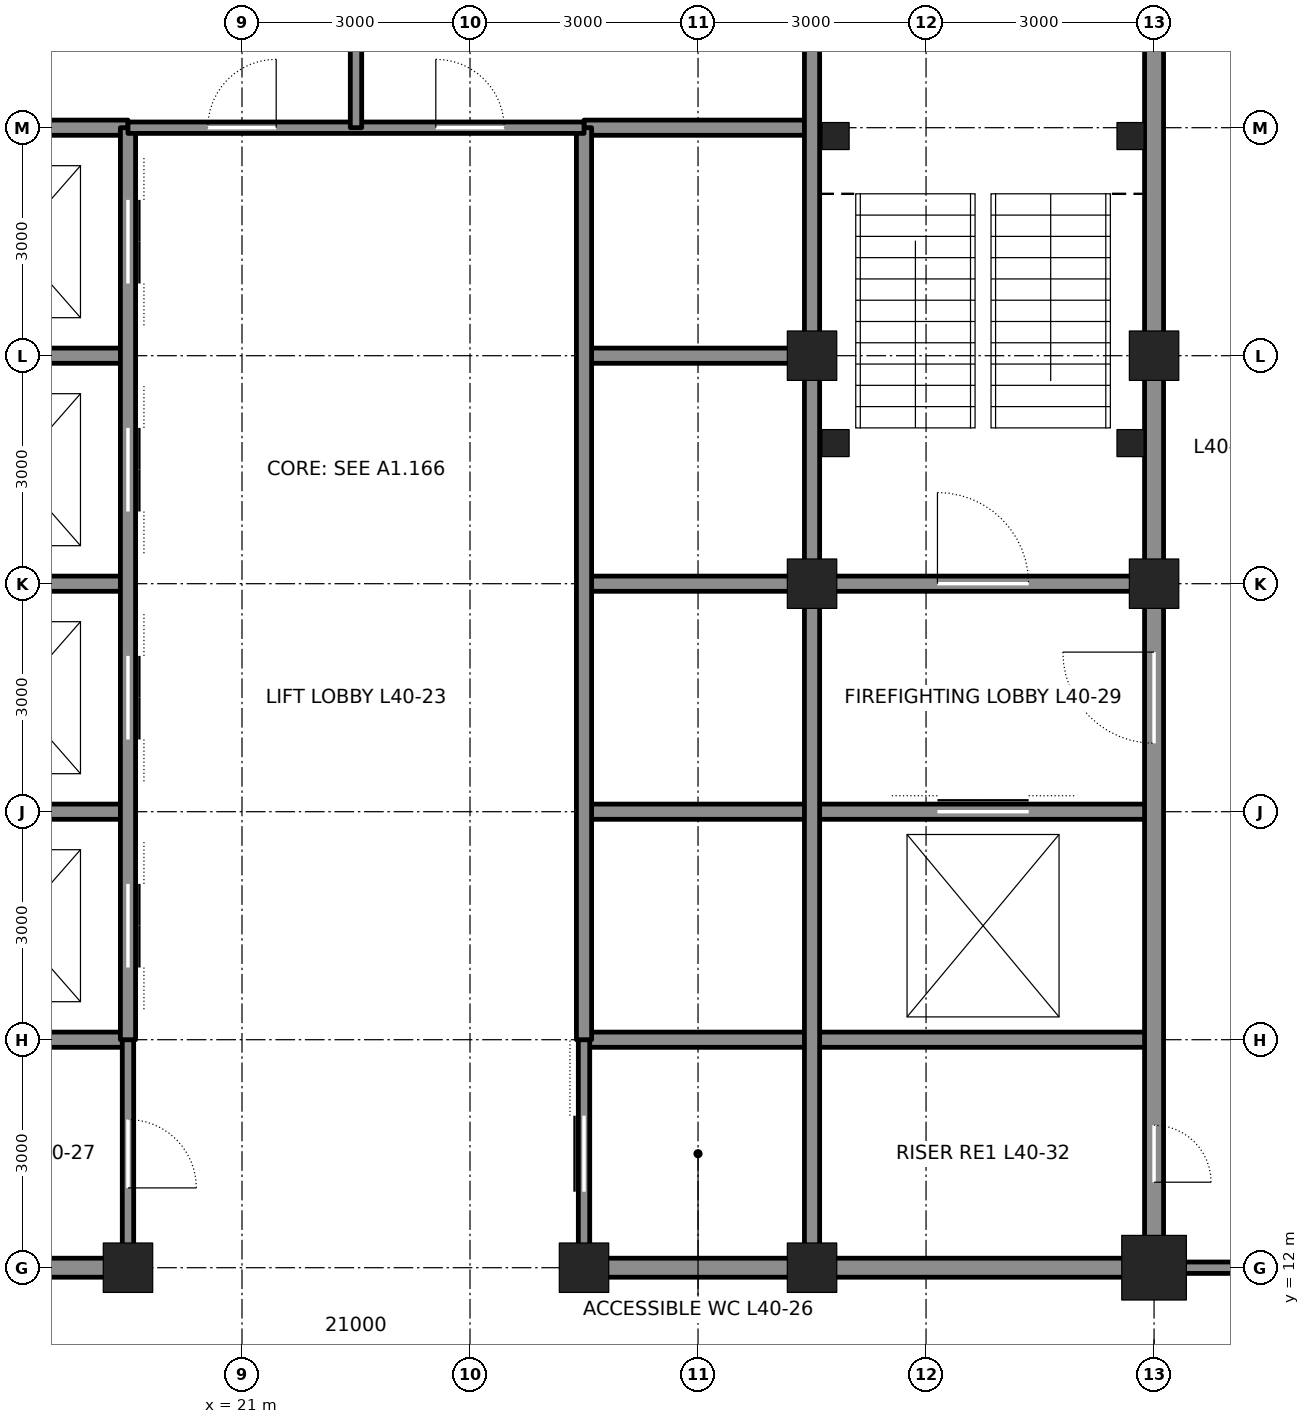
"""IFC4 building model, lengths in metres.
Left out: names, types, materials, properties, quantities, classifications, styles, units other than length and angle.
Written with IfcOpenShell. Run it as: python <this file> out.ifc"""

import sys

from ifc_helpers import new_model, si_unit, direction, frame, frame_2d, origin, origin_2d, place, context, subcontext, project, spatial, rectangle, hollow_rectangle, extrude, element, fill, save


model = new_model("IFC4")
c1 = context("Model", 3, precision=1e-05, world=origin(), true_north=direction((0.0, 1.0)))
c2 = subcontext(c1, "Body", "Model", "MODEL_VIEW")
j1 = project(units=[si_unit("LENGTHUNIT", "METRE"), si_unit("PLANEANGLEUNIT", "RADIAN")], contexts=[c1])
p1 = place(None, origin())
s1 = spatial("IfcSite", under=j1, at=p1, CompositionType="ELEMENT")
p2 = place(p1, origin())
s2 = spatial("IfcBuilding", under=s1, at=p2, CompositionType="ELEMENT")
p3 = place(p2, frame((0.0, 0.0, 184.5)))
s3 = spatial("IfcBuildingStorey", under=s2, at=p3, CompositionType="ELEMENT", Elevation=184.5)
for number, where, z_axis, x_axis in (
    (1, (19.5, 12.0, 0.0), (0.0, 0.0, 1.0), (1.0, 0.0, 0.0)),
    (2, (25.5, 12.0, 0.0), (0.0, 0.0, 1.0), (1.0, 0.0, 0.0)),
    (3, (28.5, 12.0, 0.0), (0.0, 0.0, 1.0), (1.0, 0.0, 0.0)),
):
    element("IfcColumn", number, at=place(p3, frame(where, z_axis=z_axis, x_axis=x_axis)), inside=s3, PredefinedType="COLUMN", context=c2, shape_type="SweptSolid", body=[
        extrude(hollow_rectangle(XDim=0.65, YDim=0.65, WallThickness=0.065, at=origin_2d()), origin(), (0.0, 0.0, 1.0), 4.2),
    ])
p4 = place(p3, frame((33.0, 12.0, 0.0), z_axis=(0.0, 0.0, 1.0), x_axis=(1.0, 0.0, 0.0)))
e4 = element("IfcColumn", 4, at=p4, inside=s3, PredefinedType="COLUMN", context=c2, shape_type="SweptSolid", body=[
    extrude(hollow_rectangle(XDim=0.85, YDim=0.85, WallThickness=0.085, at=origin_2d()), origin(), (0.0, 0.0, 1.0), 4.2),
])
for number, where, z_axis, x_axis in (
    (5, (33.0, 21.0, 0.0), (0.0, 0.0, 1.0), (1.0, 0.0, 0.0)),
    (6, (33.0, 24.0, 0.0), (0.0, 0.0, 1.0), (1.0, 0.0, 0.0)),
    (7, (28.5, 21.0, 0.0), (0.0, 0.0, 1.0), (1.0, 0.0, 0.0)),
    (8, (28.5, 24.0, 0.0), (0.0, 0.0, 1.0), (1.0, 0.0, 0.0)),
):
    element("IfcColumn", number, at=place(p3, frame(where, z_axis=z_axis, x_axis=x_axis)), inside=s3, PredefinedType="COLUMN", context=c2, shape_type="SweptSolid", body=[
        extrude(hollow_rectangle(XDim=0.65, YDim=0.65, WallThickness=0.065, at=origin_2d()), origin(), (0.0, 0.0, 1.0), 4.2),
    ])
for number, where, z_axis, x_axis in (
    (9, (16.75, 12.0, 0.0), (0.0, 0.0, 1.0), (1.0, 0.0, 0.0)),
    (10, (25.75, 12.0, 0.0), (0.0, 0.0, 1.0), (1.0, 0.0, 0.0)),
):
    element("IfcWall", number, at=place(p3, frame(where, z_axis=z_axis, x_axis=x_axis)), inside=s3, PredefinedType="SOLIDWALL", context=c2, shape_type="SweptSolid", body=[
        extrude(rectangle(XDim=2.5, YDim=0.25, at=frame_2d((1.25, 0.0))), origin(), (0.0, 0.0, 1.0), 3.181),
    ])
p5 = place(p3, frame((28.75, 12.0, 0.0), z_axis=(0.0, 0.0, 1.0), x_axis=(1.0, 0.0, 0.0)))
e11 = element("IfcWall", 11, at=p5, inside=s3, PredefinedType="SOLIDWALL", context=c2, shape_type="SweptSolid", body=[
    extrude(rectangle(XDim=4.0, YDim=0.25, at=frame_2d((2.0, 0.0))), origin(), (0.0, 0.0, 1.0), 3.181),
])
for number, where, z_axis, x_axis in (
    (12, (12.0, 15.0, 0.0), (0.0, 0.0, 1.0), (1.0, 0.0, 0.0)),
    (13, (25.5, 15.0, 0.0), (0.0, 0.0, 1.0), (1.0, 0.0, 0.0)),
):
    element("IfcWall", number, at=place(p3, frame(where, z_axis=z_axis, x_axis=x_axis)), inside=s3, PredefinedType="SOLIDWALL", context=c2, shape_type="SweptSolid", body=[
        extrude(rectangle(XDim=7.5, YDim=0.2, at=frame_2d((3.75, 0.0))), origin(), (0.0, 0.0, 1.0), 4.04),
    ])
for number, where, z_axis, x_axis in (
    (14, (16.75, 24.0, 0.0), (0.0, 0.0, 1.0), (1.0, 0.0, 0.0)),
    (15, (25.5, 24.0, 0.0), (0.0, 0.0, 1.0), (1.0, 0.0, 0.0)),
):
    element("IfcWall", number, at=place(p3, frame(where, z_axis=z_axis, x_axis=x_axis)), inside=s3, PredefinedType="SOLIDWALL", context=c2, shape_type="SweptSolid", body=[
        extrude(rectangle(XDim=2.75, YDim=0.2, at=frame_2d((1.375, 0.0))), origin(), (0.0, 0.0, 1.0), 3.09),
    ])
p6 = place(p3, frame((12.0, 27.0, 0.0), z_axis=(0.0, 0.0, 1.0), x_axis=(1.0, 0.0, 0.0)))
e16 = element("IfcWall", 16, at=p6, inside=s3, PredefinedType="SOLIDWALL", context=c2, shape_type="SweptSolid", body=[
    extrude(rectangle(XDim=7.5, YDim=0.2, at=frame_2d((3.75, 0.0))), origin(), (0.0, 0.0, 1.0), 4.04),
])
p7 = place(p6, frame((1.65, 0.0, 0.0)))
e17 = element("IfcOpeningElement", 17, at=p7, cuts=e16, PredefinedType="OPENING", context=c2, shape_type="SweptSolid", body=[
    extrude(rectangle(XDim=1.2, YDim=2.1, at=frame_2d((0.6, 1.05))), frame((0.0, 0.11, 0.0), z_axis=(0.0, -1.0, 0.0), x_axis=(1.0, 0.0, 0.0)), (0.0, 0.0, 1.0), 0.22),
])
for number, where, z_axis, x_axis in (
    (18, (25.5, 27.0, 0.0), (0.0, 0.0, 1.0), (1.0, 0.0, 0.0)),
    (19, (16.5, 18.0, 0.0), (0.0, 0.0, 1.0), (1.0, 0.0, 0.0)),
):
    element("IfcWall", number, at=place(p3, frame(where, z_axis=z_axis, x_axis=x_axis)), inside=s3, PredefinedType="SOLIDWALL", context=c2, shape_type="SweptSolid", body=[
        extrude(rectangle(XDim=3.0, YDim=0.2, at=frame_2d((1.5, 0.0))), origin(), (0.0, 0.0, 1.0), 4.04),
    ])
p8 = place(p3, frame((25.5, 18.0, 0.0), z_axis=(0.0, 0.0, 1.0), x_axis=(1.0, 0.0, 0.0)))
e20 = element("IfcWall", 20, at=p8, inside=s3, PredefinedType="SOLIDWALL", context=c2, shape_type="SweptSolid", body=[
    extrude(rectangle(XDim=7.5, YDim=0.2, at=frame_2d((3.75, 0.0))), origin(), (0.0, 0.0, 1.0), 4.04),
])
p9 = place(p8, frame((4.65, 0.0, 0.0)))
e21 = element("IfcOpeningElement", 21, at=p9, cuts=e20, PredefinedType="OPENING", context=c2, shape_type="SweptSolid", body=[
    extrude(rectangle(XDim=1.2, YDim=2.1, at=frame_2d((0.6, 1.05))), frame((0.0, 0.11, 0.0), z_axis=(0.0, -1.0, 0.0), x_axis=(1.0, 0.0, 0.0)), (0.0, 0.0, 1.0), 0.22),
])
for number, where, z_axis, x_axis in (
    (22, (16.75, 21.0, 0.0), (0.0, 0.0, 1.0), (1.0, 0.0, 0.0)),
    (23, (25.5, 21.0, 0.0), (0.0, 0.0, 1.0), (1.0, 0.0, 0.0)),
):
    element("IfcWall", number, at=place(p3, frame(where, z_axis=z_axis, x_axis=x_axis)), inside=s3, PredefinedType="SOLIDWALL", context=c2, shape_type="SweptSolid", body=[
        extrude(rectangle(XDim=2.75, YDim=0.2, at=frame_2d((1.375, 0.0))), origin(), (0.0, 0.0, 1.0), 3.09),
    ])
p10 = place(p3, frame((28.75, 21.0, 0.0), z_axis=(0.0, 0.0, 1.0), x_axis=(1.0, 0.0, 0.0)))
e24 = element("IfcWall", 24, at=p10, inside=s3, PredefinedType="SOLIDWALL", context=c2, shape_type="SweptSolid", body=[
    extrude(rectangle(XDim=4.0, YDim=0.2, at=frame_2d((2.0, 0.0))), origin(), (0.0, 0.0, 1.0), 3.09),
])
p11 = place(p10, frame((1.4, 0.0, 0.0)))
e25 = element("IfcOpeningElement", 25, at=p11, cuts=e24, PredefinedType="OPENING", context=c2, shape_type="SweptSolid", body=[
    extrude(rectangle(XDim=1.2, YDim=2.1, at=frame_2d((0.6, 1.05))), frame((0.0, 0.11, 0.0), z_axis=(0.0, -1.0, 0.0), x_axis=(1.0, 0.0, 0.0)), (0.0, 0.0, 1.0), 0.22),
])
p12 = place(p3, frame((19.5, 12.25, 0.0), z_axis=(0.0, 0.0, 1.0), x_axis=(0.0, 1.0, 0.0)))
e26 = element("IfcWall", 26, at=p12, inside=s3, PredefinedType="PARTITIONING", context=c2, shape_type="SweptSolid", body=[
    extrude(rectangle(XDim=2.75, YDim=0.15, at=frame_2d((1.375, 0.0))), origin(), (0.0, 0.0, 1.0), 3.065),
])
p13 = place(p12, frame((0.8, 0.0, 0.0)))
e27 = element("IfcOpeningElement", 27, at=p13, cuts=e26, PredefinedType="OPENING", context=c2, shape_type="SweptSolid", body=[
    extrude(rectangle(XDim=0.9, YDim=2.1, at=frame_2d((0.45, 1.05))), frame((0.0, 0.085, 0.0), z_axis=(0.0, -1.0, 0.0), x_axis=(1.0, 0.0, 0.0)), (0.0, 0.0, 1.0), 0.17),
])
p14 = place(p3, frame((19.5, 15.0, 0.0), z_axis=(0.0, 0.0, 1.0), x_axis=(0.0, 1.0, 0.0)))
e28 = element("IfcWall", 28, at=p14, inside=s3, PredefinedType="SOLIDWALL", context=c2, shape_type="SweptSolid", body=[
    extrude(rectangle(XDim=12.0, YDim=0.2, at=frame_2d((6.0, 0.0))), origin(), (0.0, 0.0, 1.0), 3.065),
])
p15 = place(p14, frame((0.95, 0.0, 0.0)))
e29 = element("IfcOpeningElement", 29, at=p15, cuts=e28, PredefinedType="OPENING", context=c2, shape_type="SweptSolid", body=[
    extrude(rectangle(XDim=1.1, YDim=2.1, at=frame_2d((0.55, 1.05))), frame((0.0, 0.11, 0.0), z_axis=(0.0, -1.0, 0.0), x_axis=(1.0, 0.0, 0.0)), (0.0, 0.0, 1.0), 0.22),
])
p16 = place(p14, frame((3.95, 0.0, 0.0)))
e30 = element("IfcOpeningElement", 30, at=p16, cuts=e28, PredefinedType="OPENING", context=c2, shape_type="SweptSolid", body=[
    extrude(rectangle(XDim=1.1, YDim=2.1, at=frame_2d((0.55, 1.05))), frame((0.0, 0.11, 0.0), z_axis=(0.0, -1.0, 0.0), x_axis=(1.0, 0.0, 0.0)), (0.0, 0.0, 1.0), 0.22),
])
p17 = place(p14, frame((6.95, 0.0, 0.0)))
e31 = element("IfcOpeningElement", 31, at=p17, cuts=e28, PredefinedType="OPENING", context=c2, shape_type="SweptSolid", body=[
    extrude(rectangle(XDim=1.1, YDim=2.1, at=frame_2d((0.55, 1.05))), frame((0.0, 0.11, 0.0), z_axis=(0.0, -1.0, 0.0), x_axis=(1.0, 0.0, 0.0)), (0.0, 0.0, 1.0), 0.22),
])
p18 = place(p14, frame((9.95, 0.0, 0.0)))
e32 = element("IfcOpeningElement", 32, at=p18, cuts=e28, PredefinedType="OPENING", context=c2, shape_type="SweptSolid", body=[
    extrude(rectangle(XDim=1.1, YDim=2.1, at=frame_2d((0.55, 1.05))), frame((0.0, 0.11, 0.0), z_axis=(0.0, -1.0, 0.0), x_axis=(1.0, 0.0, 0.0)), (0.0, 0.0, 1.0), 0.22),
])
p19 = place(p3, frame((25.5, 12.25, 0.0), z_axis=(0.0, 0.0, 1.0), x_axis=(0.0, 1.0, 0.0)))
e33 = element("IfcWall", 33, at=p19, inside=s3, PredefinedType="PARTITIONING", context=c2, shape_type="SweptSolid", body=[
    extrude(rectangle(XDim=2.75, YDim=0.15, at=frame_2d((1.375, 0.0))), origin(), (0.0, 0.0, 1.0), 3.065),
])
p20 = place(p19, frame((0.75, 0.0, 0.0)))
e34 = element("IfcOpeningElement", 34, at=p20, cuts=e33, PredefinedType="OPENING", context=c2, shape_type="SweptSolid", body=[
    extrude(rectangle(XDim=1.0, YDim=2.1, at=frame_2d((0.5, 1.05))), frame((0.0, 0.085, 0.0), z_axis=(0.0, -1.0, 0.0), x_axis=(1.0, 0.0, 0.0)), (0.0, 0.0, 1.0), 0.17),
])
p21 = place(p3, frame((25.5, 15.0, 0.0), z_axis=(0.0, 0.0, 1.0), x_axis=(0.0, 1.0, 0.0)))
e35 = element("IfcWall", 35, at=p21, inside=s3, PredefinedType="SOLIDWALL", context=c2, shape_type="SweptSolid", body=[
    extrude(rectangle(XDim=12.0, YDim=0.2, at=frame_2d((6.0, 0.0))), origin(), (0.0, 0.0, 1.0), 3.065),
])
p22 = place(p3, frame((28.5, 12.25, 0.0), z_axis=(0.0, 0.0, 1.0), x_axis=(0.0, 1.0, 0.0)))
e36 = element("IfcWall", 36, at=p22, inside=s3, PredefinedType="SOLIDWALL", context=c2, shape_type="SweptSolid", body=[
    extrude(rectangle(XDim=8.5, YDim=0.2, at=frame_2d((4.25, 0.0))), origin(), (0.0, 0.0, 1.0), 3.113),
])
p23 = place(p3, frame((28.5, 21.25, 0.0), z_axis=(0.0, 0.0, 1.0), x_axis=(0.0, 1.0, 0.0)))
e37 = element("IfcWall", 37, at=p23, inside=s3, PredefinedType="SOLIDWALL", context=c2, shape_type="SweptSolid", body=[
    extrude(rectangle(XDim=2.5, YDim=0.2, at=frame_2d((1.25, 0.0))), origin(), (0.0, 0.0, 1.0), 3.113),
])
p24 = place(p3, frame((28.5, 24.25, 0.0), z_axis=(0.0, 0.0, 1.0), x_axis=(0.0, 1.0, 0.0)))
e38 = element("IfcWall", 38, at=p24, inside=s3, PredefinedType="SOLIDWALL", context=c2, shape_type="SweptSolid", body=[
    extrude(rectangle(XDim=8.5, YDim=0.2, at=frame_2d((4.25, 0.0))), origin(), (0.0, 0.0, 1.0), 3.113),
])
p25 = place(p3, frame((33.0, 12.25, 0.0), z_axis=(0.0, 0.0, 1.0), x_axis=(0.0, 1.0, 0.0)))
e39 = element("IfcWall", 39, at=p25, inside=s3, PredefinedType="SOLIDWALL", context=c2, shape_type="SweptSolid", body=[
    extrude(rectangle(XDim=8.5, YDim=0.25, at=frame_2d((4.25, 0.0))), origin(), (0.0, 0.0, 1.0), 3.113),
])
p26 = place(p25, frame((6.65, 0.0, 0.0)))
e40 = element("IfcOpeningElement", 40, at=p26, cuts=e39, PredefinedType="OPENING", context=c2, shape_type="SweptSolid", body=[
    extrude(rectangle(XDim=1.2, YDim=2.1, at=frame_2d((0.6, 1.05))), frame((0.0, 0.135, 0.0), z_axis=(0.0, -1.0, 0.0), x_axis=(1.0, 0.0, 0.0)), (0.0, 0.0, 1.0), 0.27),
])
p27 = place(p25, frame((0.875, 0.0, 0.0)))
e41 = element("IfcOpeningElement", 41, at=p27, cuts=e39, PredefinedType="OPENING", context=c2, shape_type="SweptSolid", body=[
    extrude(rectangle(XDim=0.75, YDim=2.1, at=frame_2d((0.375, 1.05))), frame((0.0, 0.135, 0.0), z_axis=(0.0, -1.0, 0.0), x_axis=(1.0, 0.0, 0.0)), (0.0, 0.0, 1.0), 0.27),
])
p28 = place(p3, frame((33.0, 21.25, 0.0), z_axis=(0.0, 0.0, 1.0), x_axis=(0.0, 1.0, 0.0)))
e42 = element("IfcWall", 42, at=p28, inside=s3, PredefinedType="SOLIDWALL", context=c2, shape_type="SweptSolid", body=[
    extrude(rectangle(XDim=2.5, YDim=0.25, at=frame_2d((1.25, 0.0))), origin(), (0.0, 0.0, 1.0), 3.113),
])
p29 = place(p3, frame((33.0, 24.25, 0.0), z_axis=(0.0, 0.0, 1.0), x_axis=(0.0, 1.0, 0.0)))
e43 = element("IfcWall", 43, at=p29, inside=s3, PredefinedType="SOLIDWALL", context=c2, shape_type="SweptSolid", body=[
    extrude(rectangle(XDim=8.5, YDim=0.25, at=frame_2d((4.25, 0.0))), origin(), (0.0, 0.0, 1.0), 3.113),
])
p30 = place(p29, frame((6.875, 0.0, 0.0)))
e44 = element("IfcOpeningElement", 44, at=p30, cuts=e43, PredefinedType="OPENING", context=c2, shape_type="SweptSolid", body=[
    extrude(rectangle(XDim=0.75, YDim=2.1, at=frame_2d((0.375, 1.05))), frame((0.0, 0.135, 0.0), z_axis=(0.0, -1.0, 0.0), x_axis=(1.0, 0.0, 0.0)), (0.0, 0.0, 1.0), 0.27),
])
p31 = place(p3, frame((19.5, 27.0, 0.0), z_axis=(0.0, 0.0, 1.0), x_axis=(1.0, 0.0, 0.0)))
e45 = element("IfcWall", 45, at=p31, inside=s3, PredefinedType="PARTITIONING", context=c2, shape_type="SweptSolid", body=[
    extrude(rectangle(XDim=6.0, YDim=0.15, at=frame_2d((3.0, 0.0))), origin(), (0.0, 0.0, 1.0), 4.04),
])
p32 = place(p31, frame((1.05, 0.0, 0.0)))
e46 = element("IfcOpeningElement", 46, at=p32, cuts=e45, PredefinedType="OPENING", context=c2, shape_type="SweptSolid", body=[
    extrude(rectangle(XDim=0.9, YDim=2.1, at=frame_2d((0.45, 1.05))), frame((0.0, 0.085, 0.0), z_axis=(0.0, -1.0, 0.0), x_axis=(1.0, 0.0, 0.0)), (0.0, 0.0, 1.0), 0.17),
])
p33 = place(p31, frame((4.05, 0.0, 0.0)))
e47 = element("IfcOpeningElement", 47, at=p33, cuts=e45, PredefinedType="OPENING", context=c2, shape_type="SweptSolid", body=[
    extrude(rectangle(XDim=0.9, YDim=2.1, at=frame_2d((0.45, 1.05))), frame((0.0, 0.085, 0.0), z_axis=(0.0, -1.0, 0.0), x_axis=(1.0, 0.0, 0.0)), (0.0, 0.0, 1.0), 0.17),
])
p34 = place(p3, frame((22.5, 27.0, 0.0), z_axis=(0.0, 0.0, 1.0), x_axis=(0.0, 1.0, 0.0)))
e48 = element("IfcWall", 48, at=p34, inside=s3, PredefinedType="PARTITIONING", context=c2, shape_type="SweptSolid", body=[
    extrude(rectangle(XDim=6.0, YDim=0.15, at=frame_2d((3.0, 0.0))), origin(), (0.0, 0.0, 1.0), 4.04),
])
p35 = place(p3, frame((33.0, 12.0, 0.0), z_axis=(0.0, 0.0, 1.0), x_axis=(1.0, 0.0, 0.0)))
e49 = element("IfcWall", 49, at=p35, inside=s3, PredefinedType="PARTITIONING", context=c2, shape_type="SweptSolid", body=[
    extrude(rectangle(XDim=1.8, YDim=0.15, at=frame_2d((0.9, 0.0))), origin(), (0.0, 0.0, 1.0), 3.271),
])
for number, where, z_axis, x_axis in (
    (50, (28.81, 26.89, 0.0), (0.0, 0.0, 1.0), (1.0, 0.0, 0.0)),
    (51, (32.69, 26.89, 0.0), (0.0, 0.0, 1.0), (1.0, 0.0, 0.0)),
    (52, (28.81, 22.85, 0.0), (0.0, 0.0, 1.0), (1.0, 0.0, 0.0)),
    (53, (32.69, 22.85, 0.0), (0.0, 0.0, 1.0), (1.0, 0.0, 0.0)),
):
    element("IfcColumn", number, at=place(p3, frame(where, z_axis=z_axis, x_axis=x_axis)), inside=s3, PredefinedType="COLUMN", context=c2, shape_type="SweptSolid", body=[
        extrude(hollow_rectangle(XDim=0.356, YDim=0.356, WallThickness=0.015, at=origin_2d()), origin(), (0.0, 0.0, 1.0), 4.2),
    ])
p36 = place(p11, origin())
e54 = element("IfcDoor", 54, at=p36, inside=s3, OperationType="SINGLE_SWING_LEFT", PredefinedType="DOOR", context=c2, shape_type="SweptSolid", body=[
    extrude(rectangle(XDim=1.2, YDim=2.1, at=frame_2d((0.6, 1.05))), frame((0.0, 0.025, 0.0), z_axis=(0.0, -1.0, 0.0), x_axis=(1.0, 0.0, 0.0)), (0.0, 0.0, 1.0), 0.05),
])
fill(e25, e54)
p37 = place(p26, origin())
e55 = element("IfcDoor", 55, at=p37, inside=s3, OperationType="SINGLE_SWING_RIGHT", PredefinedType="DOOR", context=c2, shape_type="SweptSolid", body=[
    extrude(rectangle(XDim=1.2, YDim=2.1, at=frame_2d((0.6, 1.05))), frame((0.0, 0.025, 0.0), z_axis=(0.0, -1.0, 0.0), x_axis=(1.0, 0.0, 0.0)), (0.0, 0.0, 1.0), 0.05),
])
fill(e40, e55)
p38 = place(p9, origin())
e56 = element("IfcDoor", 56, at=p38, inside=s3, OperationType="DOUBLE_DOOR_SLIDING", PredefinedType="DOOR", context=c2, shape_type="SweptSolid", body=[
    extrude(rectangle(XDim=1.2, YDim=2.1, at=frame_2d((0.6, 1.05))), frame((0.0, 0.025, 0.0), z_axis=(0.0, -1.0, 0.0), x_axis=(1.0, 0.0, 0.0)), (0.0, 0.0, 1.0), 0.05),
])
fill(e21, e56)
p39 = place(p27, frame((0.75, 0.0, 0.0), z_axis=(0.0, 0.0, 1.0), x_axis=(-1.0, 0.0, 0.0)))
e57 = element("IfcDoor", 57, at=p39, inside=s3, OperationType="SINGLE_SWING_RIGHT", PredefinedType="DOOR", context=c2, shape_type="SweptSolid", body=[
    extrude(rectangle(XDim=0.75, YDim=2.1, at=frame_2d((0.375, 1.05))), frame((0.0, 0.025, 0.0), z_axis=(0.0, -1.0, 0.0), x_axis=(1.0, 0.0, 0.0)), (0.0, 0.0, 1.0), 0.05),
])
fill(e41, e57)
p40 = place(p32, origin())
e58 = element("IfcDoor", 58, at=p40, inside=s3, OperationType="SINGLE_SWING_RIGHT", PredefinedType="DOOR", context=c2, shape_type="SweptSolid", body=[
    extrude(rectangle(XDim=0.9, YDim=2.1, at=frame_2d((0.45, 1.05))), frame((0.0, 0.025, 0.0), z_axis=(0.0, -1.0, 0.0), x_axis=(1.0, 0.0, 0.0)), (0.0, 0.0, 1.0), 0.05),
])
fill(e46, e58)
p41 = place(p33, origin())
e59 = element("IfcDoor", 59, at=p41, inside=s3, OperationType="SINGLE_SWING_LEFT", PredefinedType="DOOR", context=c2, shape_type="SweptSolid", body=[
    extrude(rectangle(XDim=0.9, YDim=2.1, at=frame_2d((0.45, 1.05))), frame((0.0, 0.025, 0.0), z_axis=(0.0, -1.0, 0.0), x_axis=(1.0, 0.0, 0.0)), (0.0, 0.0, 1.0), 0.05),
])
fill(e47, e59)
p42 = place(p20, origin())
e60 = element("IfcDoor", 60, at=p42, inside=s3, OperationType="SLIDING_TO_LEFT", PredefinedType="DOOR", context=c2, shape_type="SweptSolid", body=[
    extrude(rectangle(XDim=1.0, YDim=2.1, at=frame_2d((0.5, 1.05))), frame((0.0, 0.025, 0.0), z_axis=(0.0, -1.0, 0.0), x_axis=(1.0, 0.0, 0.0)), (0.0, 0.0, 1.0), 0.05),
])
fill(e34, e60)
p43 = place(p13, frame((0.9, 0.0, 0.0), z_axis=(0.0, 0.0, 1.0), x_axis=(-1.0, 0.0, 0.0)))
e61 = element("IfcDoor", 61, at=p43, inside=s3, OperationType="SINGLE_SWING_RIGHT", PredefinedType="DOOR", context=c2, shape_type="SweptSolid", body=[
    extrude(rectangle(XDim=0.9, YDim=2.1, at=frame_2d((0.45, 1.05))), frame((0.0, 0.025, 0.0), z_axis=(0.0, -1.0, 0.0), x_axis=(1.0, 0.0, 0.0)), (0.0, 0.0, 1.0), 0.05),
])
fill(e27, e61)
p44 = place(p15, origin())
e62 = element("IfcDoor", 62, at=p44, inside=s3, OperationType="DOUBLE_DOOR_SLIDING", PredefinedType="DOOR", context=c2, shape_type="SweptSolid", body=[
    extrude(rectangle(XDim=1.1, YDim=2.1, at=frame_2d((0.55, 1.05))), frame((0.0, 0.025, 0.0), z_axis=(0.0, -1.0, 0.0), x_axis=(1.0, 0.0, 0.0)), (0.0, 0.0, 1.0), 0.05),
])
fill(e29, e62)
p45 = place(p16, origin())
e63 = element("IfcDoor", 63, at=p45, inside=s3, OperationType="DOUBLE_DOOR_SLIDING", PredefinedType="DOOR", context=c2, shape_type="SweptSolid", body=[
    extrude(rectangle(XDim=1.1, YDim=2.1, at=frame_2d((0.55, 1.05))), frame((0.0, 0.025, 0.0), z_axis=(0.0, -1.0, 0.0), x_axis=(1.0, 0.0, 0.0)), (0.0, 0.0, 1.0), 0.05),
])
fill(e30, e63)
p46 = place(p17, origin())
e64 = element("IfcDoor", 64, at=p46, inside=s3, OperationType="DOUBLE_DOOR_SLIDING", PredefinedType="DOOR", context=c2, shape_type="SweptSolid", body=[
    extrude(rectangle(XDim=1.1, YDim=2.1, at=frame_2d((0.55, 1.05))), frame((0.0, 0.025, 0.0), z_axis=(0.0, -1.0, 0.0), x_axis=(1.0, 0.0, 0.0)), (0.0, 0.0, 1.0), 0.05),
])
fill(e31, e64)
p47 = place(p18, origin())
e65 = element("IfcDoor", 65, at=p47, inside=s3, OperationType="DOUBLE_DOOR_SLIDING", PredefinedType="DOOR", context=c2, shape_type="SweptSolid", body=[
    extrude(rectangle(XDim=1.1, YDim=2.1, at=frame_2d((0.55, 1.05))), frame((0.0, 0.025, 0.0), z_axis=(0.0, -1.0, 0.0), x_axis=(1.0, 0.0, 0.0)), (0.0, 0.0, 1.0), 0.05),
])
fill(e32, e65)
save(model, sys.argv[1])
